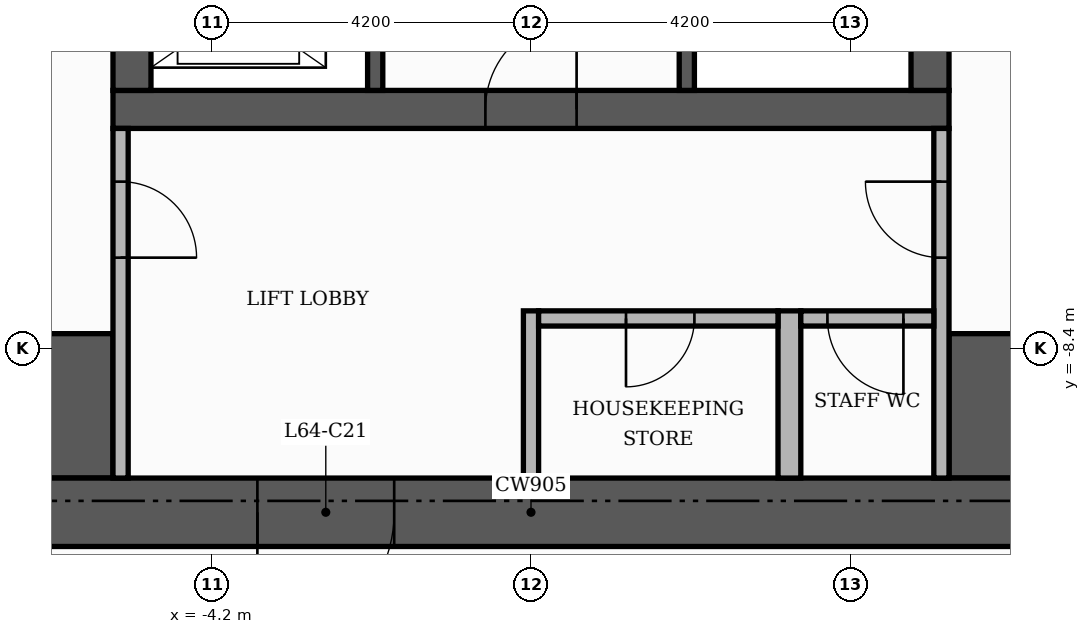
"""IFC4 building model, lengths in metres.
Left out: names, types, materials, properties, quantities, classifications, styles, units other than length and angle.
Written with IfcOpenShell. Run it as: python <this file> out.ifc"""

import sys

from ifc_helpers import new_model, si_unit, direction, frame, frame_2d, origin, place, context, subcontext, project, spatial, rectangle, extrude, element, fill, save


model = new_model("IFC4")
c1 = context("Model", 3, precision=1e-05, world=origin(), true_north=direction((0.0, 1.0)))
c2 = subcontext(c1, "Body", "Model", "MODEL_VIEW")
j1 = project(units=[si_unit("LENGTHUNIT", "METRE"), si_unit("PLANEANGLEUNIT", "RADIAN")], contexts=[c1])
p1 = place(None, origin())
s1 = spatial("IfcSite", under=j1, at=p1, CompositionType="ELEMENT")
p2 = place(p1, origin())
s2 = spatial("IfcBuilding", under=s1, at=p2, CompositionType="ELEMENT")
p3 = place(p2, frame((0.0, 0.0, 267.9)))
s3 = spatial("IfcBuildingStorey", under=s2, at=p3, CompositionType="ELEMENT", Elevation=267.9)
p4 = place(p3, frame((-5.5, -5.25, 0.0), z_axis=(0.0, 0.0, 1.0), x_axis=(1.0, 0.0, 0.0)))
e1 = element("IfcWall", 1, at=p4, inside=s3, PredefinedType="SHEAR", context=c2, shape_type="SweptSolid", body=[
    extrude(rectangle(XDim=11.0, YDim=0.5, at=frame_2d((5.5, 0.0))), origin(), (0.0, 0.0, 1.0), 3.48),
])
p5 = place(p4, frame((4.9, 0.0, 0.0)))
e2 = element("IfcOpeningElement", 2, at=p5, cuts=e1, PredefinedType="OPENING", context=c2, shape_type="SweptSolid", body=[
    extrude(rectangle(XDim=1.2, YDim=2.1, at=frame_2d((0.6, 1.05))), frame((0.0, 0.26, 0.0), z_axis=(0.0, -1.0, 0.0), x_axis=(1.0, 0.0, 0.0)), (0.0, 0.0, 1.0), 0.52),
])
for number, where, z_axis, x_axis in (
    (3, (-5.25, -5.0, 0.0), (0.0, 0.0, 1.0), (0.0, 1.0, 0.0)),
    (4, (5.25, -5.0, 0.0), (0.0, 0.0, 1.0), (0.0, 1.0, 0.0)),
):
    element("IfcWall", number, at=place(p3, frame(where, z_axis=z_axis, x_axis=x_axis)), inside=s3, PredefinedType="SHEAR", context=c2, shape_type="SweptSolid", body=[
        extrude(rectangle(XDim=10.5, YDim=0.5, at=frame_2d((5.25, 0.0))), origin(), (0.0, 0.0, 1.0), 3.48),
    ])
for number, where, z_axis, x_axis in (
    (5, (-10.1, -9.15, 0.0), (0.0, 0.0, 1.0), (1.0, 0.0, 0.0)),
    (6, (5.5, -9.15, 0.0), (0.0, 0.0, 1.0), (1.0, 0.0, 0.0)),
):
    element("IfcWall", number, at=place(p3, frame(where, z_axis=z_axis, x_axis=x_axis)), inside=s3, PredefinedType="SHEAR", context=c2, shape_type="SweptSolid", body=[
        extrude(rectangle(XDim=4.6, YDim=1.9, at=frame_2d((2.3, 0.0))), origin(), (0.0, 0.0, 1.0), 3.48),
    ])
p6 = place(p3, frame((2.05, -5.0, 0.0), z_axis=(0.0, 0.0, 1.0), x_axis=(0.0, 1.0, 0.0)))
e7 = element("IfcWall", 7, at=p6, inside=s3, PredefinedType="SHEAR", context=c2, shape_type="SweptSolid", body=[
    extrude(rectangle(XDim=6.6, YDim=0.2, at=frame_2d((3.3, 0.0))), origin(), (0.0, 0.0, 1.0), 3.48),
])
p7 = place(p6, frame((5.25, 0.0, 0.0)))
e8 = element("IfcOpeningElement", 8, at=p7, cuts=e7, PredefinedType="OPENING", context=c2, shape_type="SweptSolid", body=[
    extrude(rectangle(XDim=1.0, YDim=2.1, at=frame_2d((0.5, 1.05))), frame((0.0, 0.11, 0.0), z_axis=(0.0, -1.0, 0.0), x_axis=(1.0, 0.0, 0.0)), (0.0, 0.0, 1.0), 0.22),
])
p8 = place(p3, frame((-2.05, -5.0, 0.0), z_axis=(0.0, 0.0, 1.0), x_axis=(0.0, 1.0, 0.0)))
e9 = element("IfcWall", 9, at=p8, inside=s3, PredefinedType="SHEAR", context=c2, shape_type="SweptSolid", body=[
    extrude(rectangle(XDim=3.4, YDim=0.2, at=frame_2d((1.7, 0.0))), origin(), (0.0, 0.0, 1.0), 3.48),
])
p9 = place(p8, frame((0.55, 0.0, 0.0)))
e10 = element("IfcOpeningElement", 10, at=p9, cuts=e9, PredefinedType="OPENING", context=c2, shape_type="SweptSolid", body=[
    extrude(rectangle(XDim=1.1, YDim=2.1, at=frame_2d((0.55, 1.05))), frame((0.0, 0.11, 0.0), z_axis=(0.0, -1.0, 0.0), x_axis=(1.0, 0.0, 0.0)), (0.0, 0.0, 1.0), 0.22),
])
p10 = place(p8, frame((2.45, 0.0, 0.0)))
e11 = element("IfcOpeningElement", 11, at=p10, cuts=e9, PredefinedType="OPENING", context=c2, shape_type="SweptSolid", body=[
    extrude(rectangle(XDim=0.8, YDim=2.1, at=frame_2d((0.4, 1.05))), frame((0.0, 0.11, 0.0), z_axis=(0.0, -1.0, 0.0), x_axis=(1.0, 0.0, 0.0)), (0.0, 0.0, 1.0), 0.22),
])
p11 = place(p3, frame((-11.0, -10.55, 0.0), z_axis=(0.0, 0.0, 1.0), x_axis=(1.0, 0.0, 0.0)))
e12 = element("IfcWall", 12, at=p11, inside=s3, PredefinedType="SHEAR", context=c2, shape_type="SweptSolid", body=[
    extrude(rectangle(XDim=22.0, YDim=0.9, at=frame_2d((11.0, 0.0))), origin(), (0.0, 0.0, 1.0), 3.48),
])
p12 = place(p11, frame((7.4, 0.0, 0.0)))
e13 = element("IfcOpeningElement", 13, at=p12, cuts=e12, PredefinedType="OPENING", context=c2, shape_type="SweptSolid", body=[
    extrude(rectangle(XDim=1.8, YDim=2.2, at=frame_2d((0.9, 1.1))), frame((0.0, 0.46, 0.0), z_axis=(0.0, -1.0, 0.0), x_axis=(1.0, 0.0, 0.0)), (0.0, 0.0, 1.0), 0.92),
])
p13 = place(p3, frame((-5.4, -10.1, 0.0), z_axis=(0.0, 0.0, 1.0), x_axis=(0.0, 1.0, 0.0)))
e14 = element("IfcWall", 14, at=p13, inside=s3, PredefinedType="PARTITIONING", context=c2, shape_type="SweptSolid", body=[
    extrude(rectangle(XDim=4.6, YDim=0.2, at=frame_2d((2.3, 0.0))), origin(), (0.0, 0.0, 1.0), 3.48),
])
p14 = place(p13, frame((2.9, 0.0, 0.0)))
e15 = element("IfcOpeningElement", 15, at=p14, cuts=e14, PredefinedType="OPENING", context=c2, shape_type="SweptSolid", body=[
    extrude(rectangle(XDim=1.0, YDim=2.1, at=frame_2d((0.5, 1.05))), frame((0.0, 0.11, 0.0), z_axis=(0.0, -1.0, 0.0), x_axis=(1.0, 0.0, 0.0)), (0.0, 0.0, 1.0), 0.22),
])
p15 = place(p3, frame((0.0, -10.1, 0.0), z_axis=(0.0, 0.0, 1.0), x_axis=(0.0, 1.0, 0.0)))
e16 = element("IfcWall", 16, at=p15, inside=s3, PredefinedType="PARTITIONING", context=c2, shape_type="SweptSolid", body=[
    extrude(rectangle(XDim=2.2, YDim=0.2, at=frame_2d((1.1, 0.0))), origin(), (0.0, 0.0, 1.0), 3.48),
])
p16 = place(p3, frame((3.4, -10.1, 0.0), z_axis=(0.0, 0.0, 1.0), x_axis=(0.0, 1.0, 0.0)))
e17 = element("IfcWall", 17, at=p16, inside=s3, PredefinedType="PARTITIONING", context=c2, shape_type="SweptSolid", body=[
    extrude(rectangle(XDim=2.2, YDim=0.3, at=frame_2d((1.1, 0.0))), origin(), (0.0, 0.0, 1.0), 3.48),
])
p17 = place(p3, frame((5.4, -10.1, 0.0), z_axis=(0.0, 0.0, 1.0), x_axis=(0.0, 1.0, 0.0)))
e18 = element("IfcWall", 18, at=p17, inside=s3, PredefinedType="PARTITIONING", context=c2, shape_type="SweptSolid", body=[
    extrude(rectangle(XDim=4.6, YDim=0.2, at=frame_2d((2.3, 0.0))), origin(), (0.0, 0.0, 1.0), 3.48),
])
p18 = place(p17, frame((2.9, 0.0, 0.0)))
e19 = element("IfcOpeningElement", 19, at=p18, cuts=e18, PredefinedType="OPENING", context=c2, shape_type="SweptSolid", body=[
    extrude(rectangle(XDim=1.0, YDim=2.1, at=frame_2d((0.5, 1.05))), frame((0.0, 0.11, 0.0), z_axis=(0.0, -1.0, 0.0), x_axis=(1.0, 0.0, 0.0)), (0.0, 0.0, 1.0), 0.22),
])
p19 = place(p3, frame((0.1, -8.0, 0.0), z_axis=(0.0, 0.0, 1.0), x_axis=(1.0, 0.0, 0.0)))
e20 = element("IfcWall", 20, at=p19, inside=s3, PredefinedType="PARTITIONING", context=c2, shape_type="SweptSolid", body=[
    extrude(rectangle(XDim=3.15, YDim=0.2, at=frame_2d((1.575, 0.0))), origin(), (0.0, 0.0, 1.0), 3.48),
])
p20 = place(p19, frame((1.15, 0.0, 0.0)))
e21 = element("IfcOpeningElement", 21, at=p20, cuts=e20, PredefinedType="OPENING", context=c2, shape_type="SweptSolid", body=[
    extrude(rectangle(XDim=0.9, YDim=2.1, at=frame_2d((0.45, 1.05))), frame((0.0, 0.11, 0.0), z_axis=(0.0, -1.0, 0.0), x_axis=(1.0, 0.0, 0.0)), (0.0, 0.0, 1.0), 0.22),
])
p21 = place(p3, frame((3.55, -8.0, 0.0), z_axis=(0.0, 0.0, 1.0), x_axis=(1.0, 0.0, 0.0)))
e22 = element("IfcWall", 22, at=p21, inside=s3, PredefinedType="PARTITIONING", context=c2, shape_type="SweptSolid", body=[
    extrude(rectangle(XDim=1.75, YDim=0.2, at=frame_2d((0.875, 0.0))), origin(), (0.0, 0.0, 1.0), 3.48),
])
p22 = place(p21, frame((0.35, 0.0, 0.0)))
e23 = element("IfcOpeningElement", 23, at=p22, cuts=e22, PredefinedType="OPENING", context=c2, shape_type="SweptSolid", body=[
    extrude(rectangle(XDim=1.0, YDim=2.1, at=frame_2d((0.5, 1.05))), frame((0.0, 0.11, 0.0), z_axis=(0.0, -1.0, 0.0), x_axis=(1.0, 0.0, 0.0)), (0.0, 0.0, 1.0), 0.22),
])
p23 = place(p5, origin())
e24 = element("IfcDoor", 24, at=p23, inside=s3, OperationType="SINGLE_SWING_RIGHT", PredefinedType="DOOR", context=c2, shape_type="SweptSolid", body=[
    extrude(rectangle(XDim=1.2, YDim=2.1, at=frame_2d((0.6, 1.05))), frame((0.0, 0.025, 0.0), z_axis=(0.0, -1.0, 0.0), x_axis=(1.0, 0.0, 0.0)), (0.0, 0.0, 1.0), 0.05),
])
fill(e2, e24)
p24 = place(p14, frame((1.0, 0.0, 0.0), z_axis=(0.0, 0.0, 1.0), x_axis=(-1.0, 0.0, 0.0)))
e25 = element("IfcDoor", 25, at=p24, inside=s3, OperationType="SINGLE_SWING_LEFT", PredefinedType="DOOR", context=c2, shape_type="SweptSolid", body=[
    extrude(rectangle(XDim=1.0, YDim=2.1, at=frame_2d((0.5, 1.05))), frame((0.0, 0.025, 0.0), z_axis=(0.0, -1.0, 0.0), x_axis=(1.0, 0.0, 0.0)), (0.0, 0.0, 1.0), 0.05),
])
fill(e15, e25)
p25 = place(p18, origin())
e26 = element("IfcDoor", 26, at=p25, inside=s3, OperationType="SINGLE_SWING_RIGHT", PredefinedType="DOOR", context=c2, shape_type="SweptSolid", body=[
    extrude(rectangle(XDim=1.0, YDim=2.1, at=frame_2d((0.5, 1.05))), frame((0.0, 0.025, 0.0), z_axis=(0.0, -1.0, 0.0), x_axis=(1.0, 0.0, 0.0)), (0.0, 0.0, 1.0), 0.05),
])
fill(e19, e26)
p26 = place(p12, frame((1.8, 0.0, 0.0), z_axis=(0.0, 0.0, 1.0), x_axis=(-1.0, 0.0, 0.0)))
e27 = element("IfcDoor", 27, at=p26, inside=s3, OperationType="DOUBLE_DOOR_SINGLE_SWING", PredefinedType="DOOR", context=c2, shape_type="SweptSolid", body=[
    extrude(rectangle(XDim=1.8, YDim=2.2, at=frame_2d((0.9, 1.1))), frame((0.0, 0.025, 0.0), z_axis=(0.0, -1.0, 0.0), x_axis=(1.0, 0.0, 0.0)), (0.0, 0.0, 1.0), 0.05),
])
fill(e13, e27)
p27 = place(p20, frame((0.9, 0.0, 0.0), z_axis=(0.0, 0.0, 1.0), x_axis=(-1.0, 0.0, 0.0)))
e28 = element("IfcDoor", 28, at=p27, inside=s3, OperationType="SINGLE_SWING_LEFT", PredefinedType="DOOR", context=c2, shape_type="SweptSolid", body=[
    extrude(rectangle(XDim=0.9, YDim=2.1, at=frame_2d((0.45, 1.05))), frame((0.0, 0.025, 0.0), z_axis=(0.0, -1.0, 0.0), x_axis=(1.0, 0.0, 0.0)), (0.0, 0.0, 1.0), 0.05),
])
fill(e21, e28)
p28 = place(p22, frame((1.0, 0.0, 0.0), z_axis=(0.0, 0.0, 1.0), x_axis=(-1.0, 0.0, 0.0)))
e29 = element("IfcDoor", 29, at=p28, inside=s3, OperationType="SINGLE_SWING_RIGHT", PredefinedType="DOOR", context=c2, shape_type="SweptSolid", body=[
    extrude(rectangle(XDim=1.0, YDim=2.1, at=frame_2d((0.5, 1.05))), frame((0.0, 0.025, 0.0), z_axis=(0.0, -1.0, 0.0), x_axis=(1.0, 0.0, 0.0)), (0.0, 0.0, 1.0), 0.05),
])
fill(e23, e29)
save(model, sys.argv[1])
